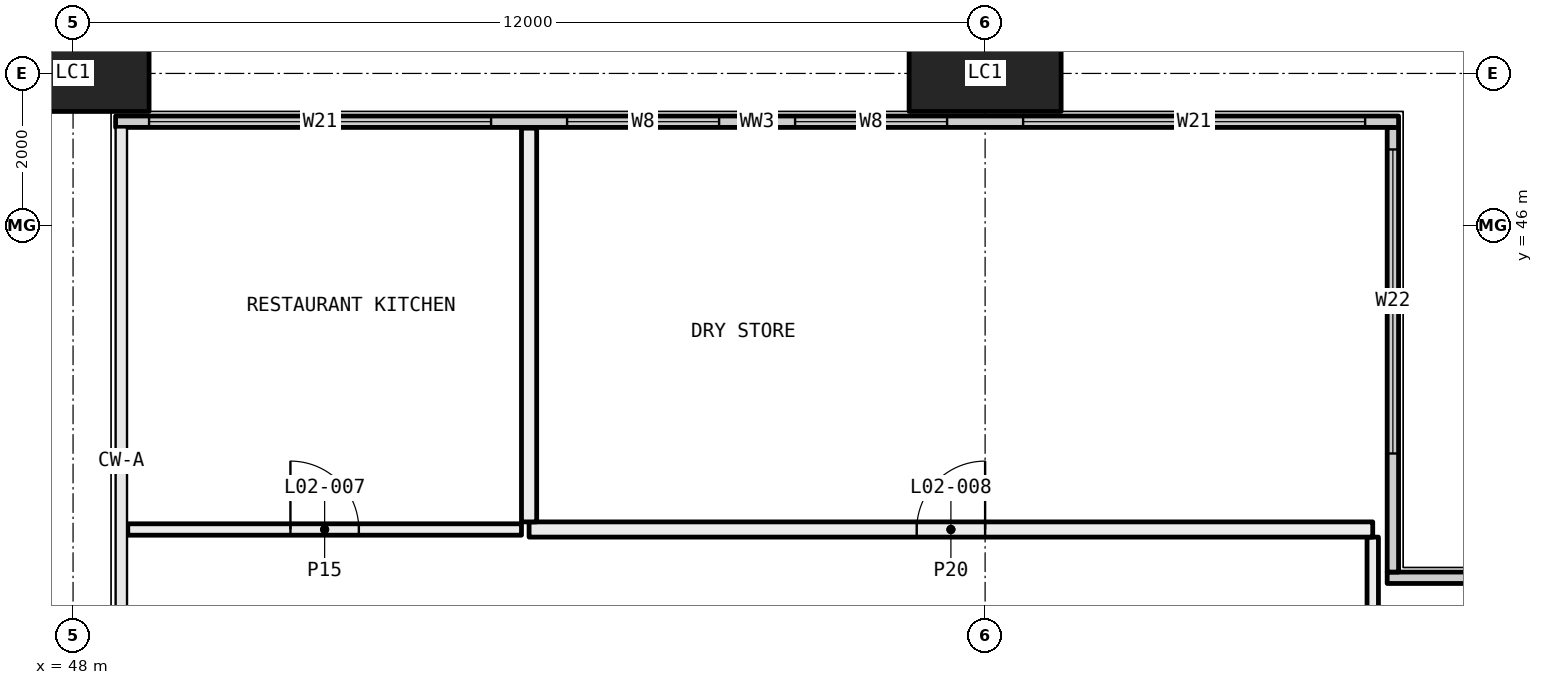
"""IFC4 building model, lengths in metres.
Left out: names, types, materials, properties, quantities, classifications, styles, units other than length and angle.
Written with IfcOpenShell. Run it as: python <this file> out.ifc"""

import sys

from ifc_helpers import new_model, si_unit, direction, frame, frame_2d, origin, origin_2d, place, context, subcontext, project, spatial, rectangle, hollow_rectangle, extrude, element, fill, save


model = new_model("IFC4")
c1 = context("Model", 3, precision=1e-05, world=origin(), true_north=direction((0.0, 1.0)))
c2 = subcontext(c1, "Body", "Model", "MODEL_VIEW")
j1 = project(units=[si_unit("LENGTHUNIT", "METRE"), si_unit("PLANEANGLEUNIT", "RADIAN")], contexts=[c1])
p1 = place(None, origin())
s1 = spatial("IfcSite", under=j1, at=p1, CompositionType="ELEMENT")
p2 = place(p1, origin())
s2 = spatial("IfcBuilding", under=s1, at=p2, CompositionType="ELEMENT")
p3 = place(p2, frame((0.0, 0.0, 12.0)))
s3 = spatial("IfcBuildingStorey", under=s2, at=p3, CompositionType="ELEMENT", Elevation=12.0)
for number, where, z_axis, x_axis in (
    (1, (48.0, 48.0, -0.4), (0.0, 0.0, 1.0), (1.0, 0.0, 0.0)),
    (2, (60.0, 48.0, -0.4), (0.0, 0.0, 1.0), (1.0, 0.0, 0.0)),
):
    element("IfcColumn", number, at=place(p3, frame(where, z_axis=z_axis, x_axis=x_axis)), inside=s3, PredefinedType="COLUMN", context=c2, shape_type="SweptSolid", body=[
        extrude(hollow_rectangle(XDim=2.0, YDim=1.0, WallThickness=0.08, at=origin_2d()), origin(), (0.0, 0.0, 1.0), 6.0),
    ])
p4 = place(p3, frame((65.29, 41.365, 0.0), z_axis=(0.0, 0.0, 1.0), x_axis=(1.0, 0.0, 0.0)))
e3 = element("IfcWall", 3, at=p4, inside=s3, PredefinedType="ELEMENTEDWALL", context=c2, shape_type="SweptSolid", body=[
    extrude(rectangle(XDim=6.15, YDim=0.15, at=frame_2d((3.075, 0.0))), origin(), (0.0, 0.0, 1.0), 5.6),
])
p5 = place(p4, frame((1.71, 0.0, 0.45)))
e4 = element("IfcOpeningElement", 4, at=p5, cuts=e3, PredefinedType="OPENING", context=c2, shape_type="SweptSolid", body=[
    extrude(rectangle(XDim=4.0, YDim=5.1, at=frame_2d((2.0, 2.55))), frame((0.0, 0.085, 0.0), z_axis=(0.0, -1.0, 0.0), x_axis=(1.0, 0.0, 0.0)), (0.0, 0.0, 1.0), 0.17),
])
p6 = place(p3, frame((65.365, 41.44, 0.0), z_axis=(0.0, 0.0, 1.0), x_axis=(0.0, 1.0, 0.0)))
e5 = element("IfcWall", 5, at=p6, inside=s3, PredefinedType="ELEMENTEDWALL", context=c2, shape_type="SweptSolid", body=[
    extrude(rectangle(XDim=5.85, YDim=0.15, at=frame_2d((2.925, 0.0))), origin(), (0.0, 0.0, 1.0), 5.6),
])
p7 = place(p6, frame((1.56, 0.0, 0.45)))
e6 = element("IfcOpeningElement", 6, at=p7, cuts=e5, PredefinedType="OPENING", context=c2, shape_type="SweptSolid", body=[
    extrude(rectangle(XDim=4.0, YDim=5.1, at=frame_2d((2.0, 2.55))), frame((0.0, 0.085, 0.0), z_axis=(0.0, -1.0, 0.0), x_axis=(1.0, 0.0, 0.0)), (0.0, 0.0, 1.0), 0.17),
])
p8 = place(p3, frame((48.56, 47.365, 0.0), z_axis=(0.0, 0.0, 1.0), x_axis=(1.0, 0.0, 0.0)))
e7 = element("IfcWall", 7, at=p8, inside=s3, PredefinedType="ELEMENTEDWALL", context=c2, shape_type="SweptSolid", body=[
    extrude(rectangle(XDim=16.88, YDim=0.15, at=frame_2d((8.44, 0.0))), origin(), (0.0, 0.0, 1.0), 5.6),
])
p9 = place(p8, frame((0.44, 0.0, 0.45)))
e8 = element("IfcOpeningElement", 8, at=p9, cuts=e7, PredefinedType="OPENING", context=c2, shape_type="SweptSolid", body=[
    extrude(rectangle(XDim=4.5, YDim=5.1, at=frame_2d((2.25, 2.55))), frame((0.0, 0.085, 0.0), z_axis=(0.0, -1.0, 0.0), x_axis=(1.0, 0.0, 0.0)), (0.0, 0.0, 1.0), 0.17),
])
p10 = place(p8, frame((5.94, 0.0, 0.45)))
e9 = element("IfcOpeningElement", 9, at=p10, cuts=e7, PredefinedType="OPENING", context=c2, shape_type="SweptSolid", body=[
    extrude(rectangle(XDim=2.0, YDim=5.1, at=frame_2d((1.0, 2.55))), frame((0.0, 0.085, 0.0), z_axis=(0.0, -1.0, 0.0), x_axis=(1.0, 0.0, 0.0)), (0.0, 0.0, 1.0), 0.17),
])
p11 = place(p8, frame((8.94, 0.0, 0.45)))
e10 = element("IfcOpeningElement", 10, at=p11, cuts=e7, PredefinedType="OPENING", context=c2, shape_type="SweptSolid", body=[
    extrude(rectangle(XDim=2.0, YDim=5.1, at=frame_2d((1.0, 2.55))), frame((0.0, 0.085, 0.0), z_axis=(0.0, -1.0, 0.0), x_axis=(1.0, 0.0, 0.0)), (0.0, 0.0, 1.0), 0.17),
])
p12 = place(p8, frame((11.94, 0.0, 0.45)))
e11 = element("IfcOpeningElement", 11, at=p12, cuts=e7, PredefinedType="OPENING", context=c2, shape_type="SweptSolid", body=[
    extrude(rectangle(XDim=4.5, YDim=5.1, at=frame_2d((2.25, 2.55))), frame((0.0, 0.085, 0.0), z_axis=(0.0, -1.0, 0.0), x_axis=(1.0, 0.0, 0.0)), (0.0, 0.0, 1.0), 0.17),
])
p13 = place(p3, frame((65.1, 36.075, 0.0), z_axis=(0.0, 0.0, 1.0), x_axis=(0.0, 1.0, 0.0)))
e12 = element("IfcWall", 12, at=p13, inside=s3, PredefinedType="PARTITIONING", context=c2, shape_type="SweptSolid", body=[
    extrude(rectangle(XDim=5.825, YDim=0.15, at=frame_2d((2.913, 0.0))), origin(), (0.0, 0.0, 1.0), 5.0),
])
p14 = place(p13, frame((2.462, 0.0, 0.0)))
e13 = element("IfcOpeningElement", 13, at=p14, cuts=e12, PredefinedType="OPENING", context=c2, shape_type="SweptSolid", body=[
    extrude(rectangle(XDim=0.9, YDim=2.1, at=frame_2d((0.45, 1.05))), frame((0.0, 0.085, 0.0), z_axis=(0.0, -1.0, 0.0), x_axis=(1.0, 0.0, 0.0)), (0.0, 0.0, 1.0), 0.17),
])
p15 = place(p3, frame((53.9, 42.0, 0.0), z_axis=(0.0, 0.0, 1.0), x_axis=(-1.0, 0.0, 0.0)))
e14 = element("IfcWall", 14, at=p15, inside=s3, PredefinedType="PARTITIONING", context=c2, shape_type="SweptSolid", body=[
    extrude(rectangle(XDim=5.18, YDim=0.15, at=frame_2d((2.59, 0.0))), origin(), (0.0, 0.0, 1.0), 5.6),
])
p16 = place(p15, frame((2.14, 0.0, 0.0)))
e15 = element("IfcOpeningElement", 15, at=p16, cuts=e14, PredefinedType="OPENING", context=c2, shape_type="SweptSolid", body=[
    extrude(rectangle(XDim=0.9, YDim=2.1, at=frame_2d((0.45, 1.05))), frame((0.0, 0.085, 0.0), z_axis=(0.0, -1.0, 0.0), x_axis=(1.0, 0.0, 0.0)), (0.0, 0.0, 1.0), 0.17),
])
p17 = place(p3, frame((65.1, 42.0, 0.0), z_axis=(0.0, 0.0, 1.0), x_axis=(-1.0, 0.0, 0.0)))
e16 = element("IfcWall", 16, at=p17, inside=s3, PredefinedType="PARTITIONING", context=c2, shape_type="SweptSolid", body=[
    extrude(rectangle(XDim=11.1, YDim=0.2, at=frame_2d((5.55, 0.0))), origin(), (0.0, 0.0, 1.0), 5.6),
])
p18 = place(p17, frame((5.1, 0.0, 0.0)))
e17 = element("IfcOpeningElement", 17, at=p18, cuts=e16, PredefinedType="OPENING", context=c2, shape_type="SweptSolid", body=[
    extrude(rectangle(XDim=0.9, YDim=2.1, at=frame_2d((0.45, 1.05))), frame((0.0, 0.11, 0.0), z_axis=(0.0, -1.0, 0.0), x_axis=(1.0, 0.0, 0.0)), (0.0, 0.0, 1.0), 0.22),
])
p19 = place(p3, frame((54.0, 42.1, 0.0), z_axis=(0.0, 0.0, 1.0), x_axis=(0.0, 1.0, 0.0)))
e18 = element("IfcWall", 18, at=p19, inside=s3, PredefinedType="PARTITIONING", context=c2, shape_type="SweptSolid", body=[
    extrude(rectangle(XDim=5.18, YDim=0.2, at=frame_2d((2.59, 0.0))), origin(), (0.0, 0.0, 1.0), 5.6),
])
p20 = place(p7, origin())
e19 = element("IfcWindow", 19, at=p20, inside=s3, PartitioningType="SINGLE_PANEL", PredefinedType="WINDOW", context=c2, shape_type="SweptSolid", body=[
    extrude(rectangle(XDim=4.0, YDim=5.1, at=frame_2d((2.0, 2.55))), frame((0.0, 0.03, 0.0), z_axis=(0.0, -1.0, 0.0), x_axis=(1.0, 0.0, 0.0)), (0.0, 0.0, 1.0), 0.06),
])
fill(e6, e19)
p21 = place(p9, origin())
e20 = element("IfcWindow", 20, at=p21, inside=s3, PartitioningType="SINGLE_PANEL", PredefinedType="WINDOW", context=c2, shape_type="SweptSolid", body=[
    extrude(rectangle(XDim=4.5, YDim=5.1, at=frame_2d((2.25, 2.55))), frame((0.0, 0.03, 0.0), z_axis=(0.0, -1.0, 0.0), x_axis=(1.0, 0.0, 0.0)), (0.0, 0.0, 1.0), 0.06),
])
fill(e8, e20)
p22 = place(p10, origin())
e21 = element("IfcWindow", 21, at=p22, inside=s3, PartitioningType="SINGLE_PANEL", PredefinedType="WINDOW", context=c2, shape_type="SweptSolid", body=[
    extrude(rectangle(XDim=2.0, YDim=5.1, at=frame_2d((1.0, 2.55))), frame((0.0, 0.03, 0.0), z_axis=(0.0, -1.0, 0.0), x_axis=(1.0, 0.0, 0.0)), (0.0, 0.0, 1.0), 0.06),
])
fill(e9, e21)
p23 = place(p11, origin())
e22 = element("IfcWindow", 22, at=p23, inside=s3, PartitioningType="SINGLE_PANEL", PredefinedType="WINDOW", context=c2, shape_type="SweptSolid", body=[
    extrude(rectangle(XDim=2.0, YDim=5.1, at=frame_2d((1.0, 2.55))), frame((0.0, 0.03, 0.0), z_axis=(0.0, -1.0, 0.0), x_axis=(1.0, 0.0, 0.0)), (0.0, 0.0, 1.0), 0.06),
])
fill(e10, e22)
p24 = place(p12, origin())
e23 = element("IfcWindow", 23, at=p24, inside=s3, PartitioningType="SINGLE_PANEL", PredefinedType="WINDOW", context=c2, shape_type="SweptSolid", body=[
    extrude(rectangle(XDim=4.5, YDim=5.1, at=frame_2d((2.25, 2.55))), frame((0.0, 0.03, 0.0), z_axis=(0.0, -1.0, 0.0), x_axis=(1.0, 0.0, 0.0)), (0.0, 0.0, 1.0), 0.06),
])
fill(e11, e23)
p25 = place(p16, frame((0.9, 0.0, 0.0), x_axis=(-1.0, 0.0, 0.0)))
e24 = element("IfcDoor", 24, at=p25, inside=s3, OperationType="SINGLE_SWING_RIGHT", PredefinedType="DOOR", context=c2, shape_type="SweptSolid", body=[
    extrude(rectangle(XDim=0.9, YDim=2.1, at=frame_2d((0.45, 1.05))), frame((0.0, 0.025, 0.0), z_axis=(0.0, -1.0, 0.0), x_axis=(1.0, 0.0, 0.0)), (0.0, 0.0, 1.0), 0.05),
])
fill(e15, e24)
p26 = place(p18, frame((0.9, 0.0, 0.0), x_axis=(-1.0, 0.0, 0.0)))
e25 = element("IfcDoor", 25, at=p26, inside=s3, OperationType="SINGLE_SWING_LEFT", PredefinedType="DOOR", context=c2, shape_type="SweptSolid", body=[
    extrude(rectangle(XDim=0.9, YDim=2.1, at=frame_2d((0.45, 1.05))), frame((0.0, 0.025, 0.0), z_axis=(0.0, -1.0, 0.0), x_axis=(1.0, 0.0, 0.0)), (0.0, 0.0, 1.0), 0.05),
])
fill(e17, e25)
save(model, sys.argv[1])
